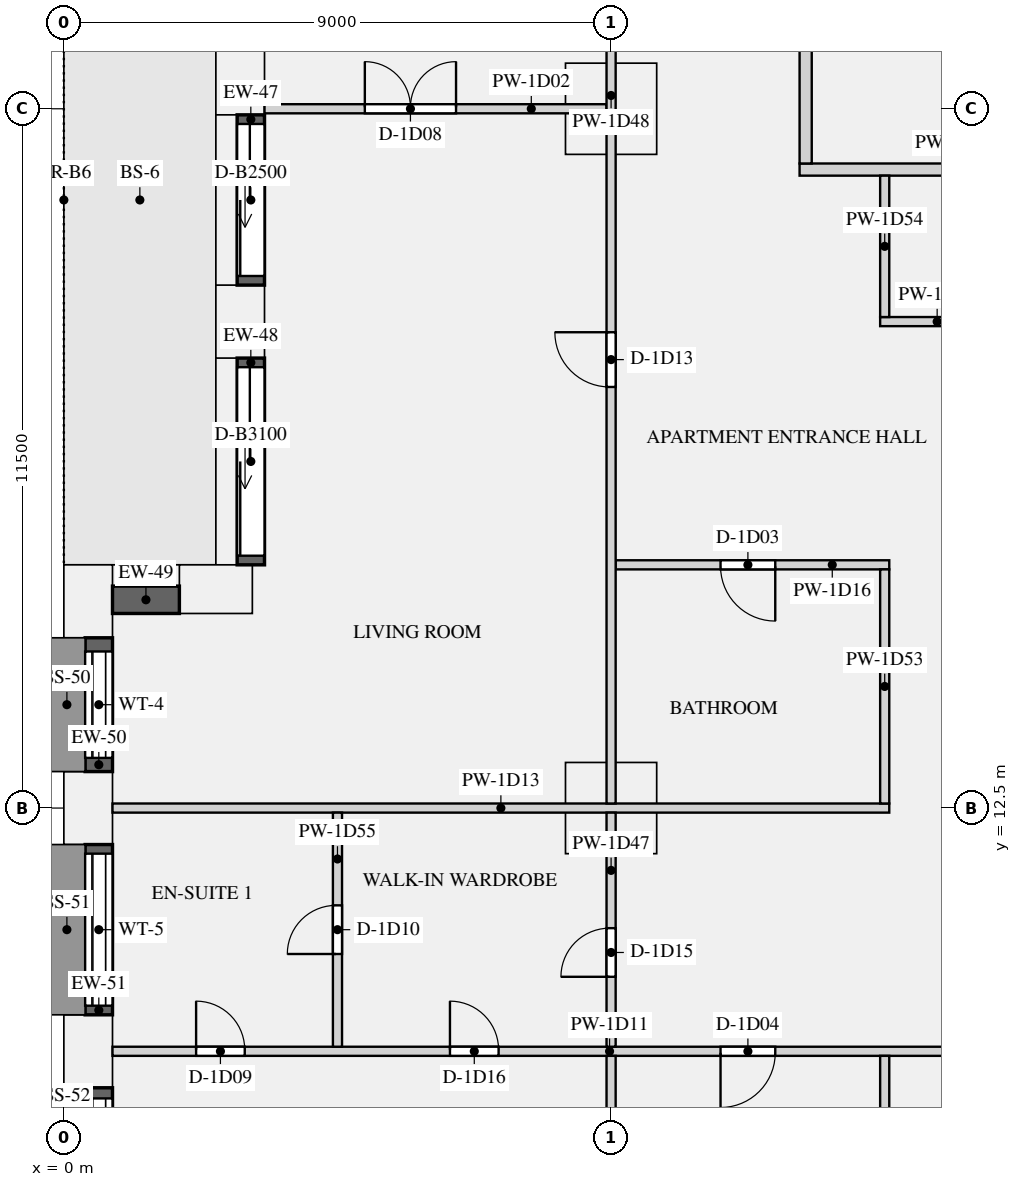
"""IFC4 building model, lengths in metres.
Left out: names, types, materials, properties, quantities, classifications, styles, units other than length and angle.
Written with IfcOpenShell. Run it as: python <this file> out.ifc"""

import sys

from ifc_helpers import new_model, si_unit, direction, frame, frame_2d, origin, origin_2d, place, context, subcontext, project, spatial, rectangle, extrude, element, fill, save


model = new_model("IFC4")
c1 = context("Model", 3, precision=1e-05, world=origin(), true_north=direction((0.0, 1.0)))
c2 = subcontext(c1, "Body", "Model", "MODEL_VIEW")
j1 = project(units=[si_unit("LENGTHUNIT", "METRE"), si_unit("PLANEANGLEUNIT", "RADIAN")], contexts=[c1])
p1 = place(None, origin())
s1 = spatial("IfcSite", under=j1, at=p1, CompositionType="ELEMENT")
p2 = place(p1, origin())
s2 = spatial("IfcBuilding", under=s1, at=p2, CompositionType="ELEMENT")
p3 = place(p2, frame((0.0, 0.0, 47.85)))
s3 = spatial("IfcBuildingStorey", under=s2, at=p3, CompositionType="ELEMENT", Elevation=47.85)
for number, where, z_axis, x_axis in (
    (1, (2.9, 24.5, 0.0), (0.0, 0.0, 1.0), (0.0, -1.0, 0.0)),
    (2, (2.9, 20.5, 0.0), (0.0, 0.0, 1.0), (0.0, -1.0, 0.0)),
    (3, (2.5, 16.1, 0.0), (0.0, 0.0, 1.0), (-1.0, 0.0, 0.0)),
    (4, (0.4, 15.9, 0.0), (0.0, 0.0, 1.0), (0.0, -1.0, 0.0)),
    (5, (0.4, 12.5, 0.0), (0.0, 0.0, 1.0), (0.0, -1.0, 0.0)),
    (6, (0.4, 8.5, 0.0), (0.0, 0.0, 1.0), (0.0, -1.0, 0.0)),
):
    element("IfcColumn", number, at=place(p3, frame(where, z_axis=z_axis, x_axis=x_axis)), inside=s3, PredefinedType="USERDEFINED", context=c2, shape_type="SweptSolid", body=[
        extrude(rectangle(XDim=1.2, YDim=0.8, at=origin_2d()), origin(), (0.0, 0.0, 1.0), 3.15),
    ])
for number, where, z_axis, x_axis in (
    (7, (9.0, 24.0, 0.0), (0.0, 0.0, 1.0), (1.0, 0.0, 0.0)),
    (8, (9.0, 12.5, 0.0), (0.0, 0.0, 1.0), (1.0, 0.0, 0.0)),
):
    element("IfcColumn", number, at=place(p3, frame(where, z_axis=z_axis, x_axis=x_axis)), inside=s3, PredefinedType="COLUMN", context=c2, shape_type="SweptSolid", body=[
        extrude(rectangle(XDim=1.5, YDim=1.5, at=origin_2d()), origin(), (0.0, 0.0, 1.0), 3.15),
    ])
p4 = place(p3, frame((3.075, 23.9, 0.0), z_axis=(0.0, 0.0, 1.0), x_axis=(0.0, -1.0, 0.0)))
e9 = element("IfcWall", 9, at=p4, inside=s3, PredefinedType="SOLIDWALL", context=c2, shape_type="SweptSolid", body=[
    extrude(rectangle(XDim=2.8, YDim=0.45, at=frame_2d((1.4, 0.0))), origin(), (0.0, 0.0, 1.0), 2.83),
])
p5 = place(p4, frame((0.15, 0.0, 0.0)))
e10 = element("IfcOpeningElement", 10, at=p5, cuts=e9, PredefinedType="OPENING", context=c2, shape_type="SweptSolid", body=[
    extrude(rectangle(XDim=2.5, YDim=2.3, at=frame_2d((1.25, 1.15))), frame((0.0, 0.235, 0.0), z_axis=(0.0, -1.0, 0.0), x_axis=(1.0, 0.0, 0.0)), (0.0, 0.0, 1.0), 0.47),
])
p6 = place(p3, frame((3.075, 19.9, 0.0), z_axis=(0.0, 0.0, 1.0), x_axis=(0.0, -1.0, 0.0)))
e11 = element("IfcWall", 11, at=p6, inside=s3, PredefinedType="SOLIDWALL", context=c2, shape_type="SweptSolid", body=[
    extrude(rectangle(XDim=3.4, YDim=0.45, at=frame_2d((1.7, 0.0))), origin(), (0.0, 0.0, 1.0), 2.83),
])
p7 = place(p6, frame((0.15, 0.0, 0.0)))
e12 = element("IfcOpeningElement", 12, at=p7, cuts=e11, PredefinedType="OPENING", context=c2, shape_type="SweptSolid", body=[
    extrude(rectangle(XDim=3.1, YDim=2.3, at=frame_2d((1.55, 1.15))), frame((0.0, 0.235, 0.0), z_axis=(0.0, -1.0, 0.0), x_axis=(1.0, 0.0, 0.0)), (0.0, 0.0, 1.0), 0.47),
])
p8 = place(p3, frame((1.9, 15.925, 0.9), z_axis=(0.0, 0.0, 1.0), x_axis=(-1.0, 0.0, 0.0)))
e13 = element("IfcWall", 13, at=p8, inside=s3, PredefinedType="SOLIDWALL", context=c2, shape_type="SweptSolid", body=[
    extrude(rectangle(XDim=1.1, YDim=0.45, at=frame_2d((0.55, 0.0))), origin(), (0.0, 0.0, 1.0), 1.93),
])
p9 = place(p3, frame((0.575, 15.3, 0.9), z_axis=(0.0, 0.0, 1.0), x_axis=(0.0, -1.0, 0.0)))
e14 = element("IfcWall", 14, at=p9, inside=s3, PredefinedType="SOLIDWALL", context=c2, shape_type="SweptSolid", body=[
    extrude(rectangle(XDim=2.2, YDim=0.45, at=frame_2d((1.1, 0.0))), origin(), (0.0, 0.0, 1.0), 1.93),
])
p10 = place(p9, frame((0.225, 0.0, 0.15)))
e15 = element("IfcOpeningElement", 15, at=p10, cuts=e14, PredefinedType="OPENING", context=c2, shape_type="SweptSolid", body=[
    extrude(rectangle(XDim=1.75, YDim=1.5, at=frame_2d((0.875, 0.75))), frame((0.0, 0.235, 0.0), z_axis=(0.0, -1.0, 0.0), x_axis=(1.0, 0.0, 0.0)), (0.0, 0.0, 1.0), 0.47),
])
p11 = place(p3, frame((0.575, 11.9, 0.9), z_axis=(0.0, 0.0, 1.0), x_axis=(0.0, -1.0, 0.0)))
e16 = element("IfcWall", 16, at=p11, inside=s3, PredefinedType="SOLIDWALL", context=c2, shape_type="SweptSolid", body=[
    extrude(rectangle(XDim=2.8, YDim=0.45, at=frame_2d((1.4, 0.0))), origin(), (0.0, 0.0, 1.0), 1.93),
])
p12 = place(p11, frame((0.15, 0.0, 0.15)))
e17 = element("IfcOpeningElement", 17, at=p12, cuts=e16, PredefinedType="OPENING", context=c2, shape_type="SweptSolid", body=[
    extrude(rectangle(XDim=2.5, YDim=1.5, at=frame_2d((1.25, 0.75))), frame((0.0, 0.235, 0.0), z_axis=(0.0, -1.0, 0.0), x_axis=(1.0, 0.0, 0.0)), (0.0, 0.0, 1.0), 0.47),
])
p13 = place(p3, frame((0.575, 7.9, 0.9), z_axis=(0.0, 0.0, 1.0), x_axis=(0.0, -1.0, 0.0)))
e18 = element("IfcWall", 18, at=p13, inside=s3, PredefinedType="SOLIDWALL", context=c2, shape_type="SweptSolid", body=[
    extrude(rectangle(XDim=2.6, YDim=0.45, at=frame_2d((1.3, 0.0))), origin(), (0.0, 0.0, 1.0), 1.93),
])
p14 = place(p13, frame((0.175, 0.0, 0.15)))
e19 = element("IfcOpeningElement", 19, at=p14, cuts=e18, PredefinedType="OPENING", context=c2, shape_type="SweptSolid", body=[
    extrude(rectangle(XDim=2.25, YDim=1.5, at=frame_2d((1.125, 0.75))), frame((0.0, 0.235, 0.0), z_axis=(0.0, -1.0, 0.0), x_axis=(1.0, 0.0, 0.0)), (0.0, 0.0, 1.0), 0.47),
])
p15 = place(p3, frame((12.1, 23.0, 0.0), z_axis=(0.0, 0.0, 1.0), x_axis=(1.0, 0.0, 0.0)))
e20 = element("IfcWall", 20, at=p15, inside=s3, PredefinedType="PARTITIONING", context=c2, shape_type="SweptSolid", body=[
    extrude(rectangle(XDim=5.0, YDim=0.2, at=frame_2d((2.5, 0.0))), origin(), (0.0, 0.0, 1.0), 2.83),
])
p16 = place(p3, frame((12.2, 23.1, 0.0), z_axis=(0.0, 0.0, 1.0), x_axis=(0.0, 1.0, 0.0)))
e21 = element("IfcWall", 21, at=p16, inside=s3, PredefinedType="PARTITIONING", context=c2, shape_type="SweptSolid", body=[
    extrude(rectangle(XDim=3.9, YDim=0.2, at=frame_2d((1.95, 0.0))), origin(), (0.0, 0.0, 1.0), 2.83),
])
p17 = place(p3, frame((3.3, 24.0, 0.0), z_axis=(0.0, 0.0, 1.0), x_axis=(1.0, 0.0, 0.0)))
e22 = element("IfcWall", 22, at=p17, inside=s3, PredefinedType="PARTITIONING", context=c2, shape_type="SweptSolid", body=[
    extrude(rectangle(XDim=5.625, YDim=0.15, at=frame_2d((2.812, 0.0))), origin(), (0.0, 0.0, 1.0), 2.83),
])
p18 = place(p17, frame((1.65, 0.0, 0.0)))
e23 = element("IfcOpeningElement", 23, at=p18, cuts=e22, PredefinedType="OPENING", context=c2, shape_type="SweptSolid", body=[
    extrude(rectangle(XDim=1.5, YDim=2.1, at=frame_2d((0.75, 1.05))), frame((0.0, 0.085, 0.0), z_axis=(0.0, -1.0, 0.0), x_axis=(1.0, 0.0, 0.0)), (0.0, 0.0, 1.0), 0.17),
])
p19 = place(p3, frame((0.8, 8.5, 0.0), z_axis=(0.0, 0.0, 1.0), x_axis=(1.0, 0.0, 0.0)))
e24 = element("IfcWall", 24, at=p19, inside=s3, PredefinedType="PARTITIONING", context=c2, shape_type="SweptSolid", body=[
    extrude(rectangle(XDim=17.2, YDim=0.15, at=frame_2d((8.6, 0.0))), origin(), (0.0, 0.0, 1.0), 2.83),
])
p20 = place(p19, frame((10.0, 0.0, 0.0)))
e25 = element("IfcOpeningElement", 25, at=p20, cuts=e24, PredefinedType="OPENING", context=c2, shape_type="SweptSolid", body=[
    extrude(rectangle(XDim=0.9, YDim=2.1, at=frame_2d((0.45, 1.05))), frame((0.0, 0.085, 0.0), z_axis=(0.0, -1.0, 0.0), x_axis=(1.0, 0.0, 0.0)), (0.0, 0.0, 1.0), 0.17),
])
p21 = place(p19, frame((14.5, 0.0, 0.0)))
e26 = element("IfcOpeningElement", 26, at=p21, cuts=e24, PredefinedType="OPENING", context=c2, shape_type="SweptSolid", body=[
    extrude(rectangle(XDim=0.9, YDim=2.1, at=frame_2d((0.45, 1.05))), frame((0.0, 0.085, 0.0), z_axis=(0.0, -1.0, 0.0), x_axis=(1.0, 0.0, 0.0)), (0.0, 0.0, 1.0), 0.17),
])
p22 = place(p19, frame((1.375, 0.0, 0.0)))
e27 = element("IfcOpeningElement", 27, at=p22, cuts=e24, PredefinedType="OPENING", context=c2, shape_type="SweptSolid", body=[
    extrude(rectangle(XDim=0.8, YDim=2.1, at=frame_2d((0.4, 1.05))), frame((0.0, 0.085, 0.0), z_axis=(0.0, -1.0, 0.0), x_axis=(1.0, 0.0, 0.0)), (0.0, 0.0, 1.0), 0.17),
])
p23 = place(p19, frame((5.55, 0.0, 0.0)))
e28 = element("IfcOpeningElement", 28, at=p23, cuts=e24, PredefinedType="OPENING", context=c2, shape_type="SweptSolid", body=[
    extrude(rectangle(XDim=0.8, YDim=2.1, at=frame_2d((0.4, 1.05))), frame((0.0, 0.085, 0.0), z_axis=(0.0, -1.0, 0.0), x_axis=(1.0, 0.0, 0.0)), (0.0, 0.0, 1.0), 0.17),
])
p24 = place(p3, frame((0.8, 12.5, 0.0), z_axis=(0.0, 0.0, 1.0), x_axis=(1.0, 0.0, 0.0)))
e29 = element("IfcWall", 29, at=p24, inside=s3, PredefinedType="PARTITIONING", context=c2, shape_type="SweptSolid", body=[
    extrude(rectangle(XDim=12.775, YDim=0.15, at=frame_2d((6.387, 0.0))), origin(), (0.0, 0.0, 1.0), 2.83),
])
p25 = place(p3, frame((13.425, 20.5, 0.0), z_axis=(0.0, 0.0, 1.0), x_axis=(1.0, 0.0, 0.0)))
e30 = element("IfcWall", 30, at=p25, inside=s3, PredefinedType="PARTITIONING", context=c2, shape_type="SweptSolid", body=[
    extrude(rectangle(XDim=4.475, YDim=0.15, at=frame_2d((2.237, 0.0))), origin(), (0.0, 0.0, 1.0), 2.83),
])
p26 = place(p25, frame((1.875, 0.0, 0.0)))
e31 = element("IfcOpeningElement", 31, at=p26, cuts=e30, PredefinedType="OPENING", context=c2, shape_type="SweptSolid", body=[
    extrude(rectangle(XDim=0.9, YDim=2.1, at=frame_2d((0.45, 1.05))), frame((0.0, 0.085, 0.0), z_axis=(0.0, -1.0, 0.0), x_axis=(1.0, 0.0, 0.0)), (0.0, 0.0, 1.0), 0.17),
])
p27 = place(p3, frame((9.075, 16.5, 0.0), z_axis=(0.0, 0.0, 1.0), x_axis=(1.0, 0.0, 0.0)))
e32 = element("IfcWall", 32, at=p27, inside=s3, PredefinedType="PARTITIONING", context=c2, shape_type="SweptSolid", body=[
    extrude(rectangle(XDim=4.5, YDim=0.15, at=frame_2d((2.25, 0.0))), origin(), (0.0, 0.0, 1.0), 2.83),
])
p28 = place(p27, frame((1.725, 0.0, 0.0)))
e33 = element("IfcOpeningElement", 33, at=p28, cuts=e32, PredefinedType="OPENING", context=c2, shape_type="SweptSolid", body=[
    extrude(rectangle(XDim=0.9, YDim=2.1, at=frame_2d((0.45, 1.05))), frame((0.0, 0.085, 0.0), z_axis=(0.0, -1.0, 0.0), x_axis=(1.0, 0.0, 0.0)), (0.0, 0.0, 1.0), 0.17),
])
p29 = place(p3, frame((9.0, 0.8, 0.0), z_axis=(0.0, 0.0, 1.0), x_axis=(0.0, 1.0, 0.0)))
e34 = element("IfcWall", 34, at=p29, inside=s3, PredefinedType="PARTITIONING", context=c2, shape_type="SweptSolid", body=[
    extrude(rectangle(XDim=7.625, YDim=0.15, at=frame_2d((3.812, 0.0))), origin(), (0.0, 0.0, 1.0), 2.83),
])
p30 = place(p3, frame((9.0, 8.575, 0.0), z_axis=(0.0, 0.0, 1.0), x_axis=(0.0, 1.0, 0.0)))
e35 = element("IfcWall", 35, at=p30, inside=s3, PredefinedType="PARTITIONING", context=c2, shape_type="SweptSolid", body=[
    extrude(rectangle(XDim=3.85, YDim=0.15, at=frame_2d((1.925, 0.0))), origin(), (0.0, 0.0, 1.0), 2.83),
])
p31 = place(p30, frame((1.15, 0.0, 0.0)))
e36 = element("IfcOpeningElement", 36, at=p31, cuts=e35, PredefinedType="OPENING", context=c2, shape_type="SweptSolid", body=[
    extrude(rectangle(XDim=0.8, YDim=2.1, at=frame_2d((0.4, 1.05))), frame((0.0, 0.085, 0.0), z_axis=(0.0, -1.0, 0.0), x_axis=(1.0, 0.0, 0.0)), (0.0, 0.0, 1.0), 0.17),
])
p32 = place(p3, frame((9.0, 12.575, 0.0), z_axis=(0.0, 0.0, 1.0), x_axis=(0.0, 1.0, 0.0)))
e37 = element("IfcWall", 37, at=p32, inside=s3, PredefinedType="PARTITIONING", context=c2, shape_type="SweptSolid", body=[
    extrude(rectangle(XDim=19.725, YDim=0.15, at=frame_2d((9.863, 0.0))), origin(), (0.0, 0.0, 1.0), 2.83),
])
p33 = place(p32, frame((15.537, 0.0, 0.0)))
e38 = element("IfcOpeningElement", 38, at=p33, cuts=e37, PredefinedType="OPENING", context=c2, shape_type="SweptSolid", body=[
    extrude(rectangle(XDim=0.9, YDim=2.1, at=frame_2d((0.45, 1.05))), frame((0.0, 0.085, 0.0), z_axis=(0.0, -1.0, 0.0), x_axis=(1.0, 0.0, 0.0)), (0.0, 0.0, 1.0), 0.17),
])
p34 = place(p32, frame((6.85, 0.0, 0.0)))
e39 = element("IfcOpeningElement", 39, at=p34, cuts=e37, PredefinedType="OPENING", context=c2, shape_type="SweptSolid", body=[
    extrude(rectangle(XDim=0.9, YDim=2.1, at=frame_2d((0.45, 1.05))), frame((0.0, 0.085, 0.0), z_axis=(0.0, -1.0, 0.0), x_axis=(1.0, 0.0, 0.0)), (0.0, 0.0, 1.0), 0.17),
])
p35 = place(p3, frame((13.5, 0.8, 0.0), z_axis=(0.0, 0.0, 1.0), x_axis=(0.0, 1.0, 0.0)))
e40 = element("IfcWall", 40, at=p35, inside=s3, PredefinedType="PARTITIONING", context=c2, shape_type="SweptSolid", body=[
    extrude(rectangle(XDim=7.625, YDim=0.15, at=frame_2d((3.812, 0.0))), origin(), (0.0, 0.0, 1.0), 2.83),
])
p36 = place(p3, frame((13.5, 12.575, 0.0), z_axis=(0.0, 0.0, 1.0), x_axis=(0.0, 1.0, 0.0)))
e41 = element("IfcWall", 41, at=p36, inside=s3, PredefinedType="PARTITIONING", context=c2, shape_type="SweptSolid", body=[
    extrude(rectangle(XDim=3.85, YDim=0.15, at=frame_2d((1.925, 0.0))), origin(), (0.0, 0.0, 1.0), 2.83),
])
p37 = place(p3, frame((13.5, 20.575, 0.0), z_axis=(0.0, 0.0, 1.0), x_axis=(0.0, 1.0, 0.0)))
e42 = element("IfcWall", 42, at=p37, inside=s3, PredefinedType="PARTITIONING", context=c2, shape_type="SweptSolid", body=[
    extrude(rectangle(XDim=2.325, YDim=0.15, at=frame_2d((1.163, 0.0))), origin(), (0.0, 0.0, 1.0), 2.83),
])
p38 = place(p3, frame((4.5, 8.575, 0.0), z_axis=(0.0, 0.0, 1.0), x_axis=(0.0, 1.0, 0.0)))
e43 = element("IfcWall", 43, at=p38, inside=s3, PredefinedType="PARTITIONING", context=c2, shape_type="SweptSolid", body=[
    extrude(rectangle(XDim=3.85, YDim=0.15, at=frame_2d((1.925, 0.0))), origin(), (0.0, 0.0, 1.0), 2.83),
])
p39 = place(p38, frame((1.525, 0.0, 0.0)))
e44 = element("IfcOpeningElement", 44, at=p39, cuts=e43, PredefinedType="OPENING", context=c2, shape_type="SweptSolid", body=[
    extrude(rectangle(XDim=0.8, YDim=2.1, at=frame_2d((0.4, 1.05))), frame((0.0, 0.085, 0.0), z_axis=(0.0, -1.0, 0.0), x_axis=(1.0, 0.0, 0.0)), (0.0, 0.0, 1.0), 0.17),
])
p40 = place(p5, origin())
e45 = element("IfcDoor", 45, at=p40, inside=s3, OperationType="SLIDING_TO_LEFT", PredefinedType="DOOR", context=c2, shape_type="SweptSolid", body=[
    extrude(rectangle(XDim=2.5, YDim=2.3, at=frame_2d((1.25, 1.15))), frame((0.0, -0.07, 0.0), z_axis=(0.0, -1.0, 0.0), x_axis=(1.0, 0.0, 0.0)), (0.0, 0.0, 1.0), 0.05),
])
fill(e10, e45)
p41 = place(p7, origin())
e46 = element("IfcDoor", 46, at=p41, inside=s3, OperationType="SLIDING_TO_LEFT", PredefinedType="DOOR", context=c2, shape_type="SweptSolid", body=[
    extrude(rectangle(XDim=3.1, YDim=2.3, at=frame_2d((1.55, 1.15))), frame((0.0, -0.07, 0.0), z_axis=(0.0, -1.0, 0.0), x_axis=(1.0, 0.0, 0.0)), (0.0, 0.0, 1.0), 0.05),
])
fill(e12, e46)
p42 = place(p10, origin())
e47 = element("IfcWindow", 47, at=p42, inside=s3, PartitioningType="SINGLE_PANEL", PredefinedType="WINDOW", context=c2, shape_type="SweptSolid", body=[
    extrude(rectangle(XDim=1.75, YDim=1.5, at=frame_2d((0.875, 0.75))), frame((0.0, -0.065, 0.0), z_axis=(0.0, -1.0, 0.0), x_axis=(1.0, 0.0, 0.0)), (0.0, 0.0, 1.0), 0.06),
])
fill(e15, e47)
p43 = place(p12, origin())
e48 = element("IfcWindow", 48, at=p43, inside=s3, PartitioningType="SINGLE_PANEL", PredefinedType="WINDOW", context=c2, shape_type="SweptSolid", body=[
    extrude(rectangle(XDim=2.5, YDim=1.5, at=frame_2d((1.25, 0.75))), frame((0.0, -0.065, 0.0), z_axis=(0.0, -1.0, 0.0), x_axis=(1.0, 0.0, 0.0)), (0.0, 0.0, 1.0), 0.06),
])
fill(e17, e48)
p44 = place(p14, origin())
e49 = element("IfcWindow", 49, at=p44, inside=s3, PartitioningType="SINGLE_PANEL", PredefinedType="WINDOW", context=c2, shape_type="SweptSolid", body=[
    extrude(rectangle(XDim=2.25, YDim=1.5, at=frame_2d((1.125, 0.75))), frame((0.0, -0.065, 0.0), z_axis=(0.0, -1.0, 0.0), x_axis=(1.0, 0.0, 0.0)), (0.0, 0.0, 1.0), 0.06),
])
fill(e19, e49)
p45 = place(p28, frame((0.9, 0.0, 0.0), z_axis=(0.0, 0.0, 1.0), x_axis=(-1.0, 0.0, 0.0)))
e50 = element("IfcDoor", 50, at=p45, inside=s3, OperationType="SINGLE_SWING_LEFT", PredefinedType="DOOR", context=c2, shape_type="SweptSolid", body=[
    extrude(rectangle(XDim=0.9, YDim=2.1, at=frame_2d((0.45, 1.05))), frame((0.0, 0.025, 0.0), z_axis=(0.0, -1.0, 0.0), x_axis=(1.0, 0.0, 0.0)), (0.0, 0.0, 1.0), 0.05),
])
fill(e33, e50)
p46 = place(p20, frame((0.9, 0.0, 0.0), z_axis=(0.0, 0.0, 1.0), x_axis=(-1.0, 0.0, 0.0)))
e51 = element("IfcDoor", 51, at=p46, inside=s3, OperationType="SINGLE_SWING_RIGHT", PredefinedType="DOOR", context=c2, shape_type="SweptSolid", body=[
    extrude(rectangle(XDim=0.9, YDim=2.1, at=frame_2d((0.45, 1.05))), frame((0.0, 0.025, 0.0), z_axis=(0.0, -1.0, 0.0), x_axis=(1.0, 0.0, 0.0)), (0.0, 0.0, 1.0), 0.05),
])
fill(e25, e51)
p47 = place(p18, origin())
e52 = element("IfcDoor", 52, at=p47, inside=s3, OperationType="DOUBLE_DOOR_SINGLE_SWING", PredefinedType="DOOR", context=c2, shape_type="SweptSolid", body=[
    extrude(rectangle(XDim=1.5, YDim=2.1, at=frame_2d((0.75, 1.05))), frame((0.0, 0.025, 0.0), z_axis=(0.0, -1.0, 0.0), x_axis=(1.0, 0.0, 0.0)), (0.0, 0.0, 1.0), 0.05),
])
fill(e23, e52)
p48 = place(p22, origin())
e53 = element("IfcDoor", 53, at=p48, inside=s3, OperationType="SINGLE_SWING_LEFT", PredefinedType="DOOR", context=c2, shape_type="SweptSolid", body=[
    extrude(rectangle(XDim=0.8, YDim=2.1, at=frame_2d((0.4, 1.05))), frame((0.0, 0.025, 0.0), z_axis=(0.0, -1.0, 0.0), x_axis=(1.0, 0.0, 0.0)), (0.0, 0.0, 1.0), 0.05),
])
fill(e27, e53)
p49 = place(p39, origin())
e54 = element("IfcDoor", 54, at=p49, inside=s3, OperationType="SINGLE_SWING_LEFT", PredefinedType="DOOR", context=c2, shape_type="SweptSolid", body=[
    extrude(rectangle(XDim=0.8, YDim=2.1, at=frame_2d((0.4, 1.05))), frame((0.0, 0.025, 0.0), z_axis=(0.0, -1.0, 0.0), x_axis=(1.0, 0.0, 0.0)), (0.0, 0.0, 1.0), 0.05),
])
fill(e44, e54)
p50 = place(p34, origin())
e55 = element("IfcDoor", 55, at=p50, inside=s3, OperationType="SINGLE_SWING_RIGHT", PredefinedType="DOOR", context=c2, shape_type="SweptSolid", body=[
    extrude(rectangle(XDim=0.9, YDim=2.1, at=frame_2d((0.45, 1.05))), frame((0.0, 0.025, 0.0), z_axis=(0.0, -1.0, 0.0), x_axis=(1.0, 0.0, 0.0)), (0.0, 0.0, 1.0), 0.05),
])
fill(e39, e55)
p51 = place(p31, origin())
e56 = element("IfcDoor", 56, at=p51, inside=s3, OperationType="SINGLE_SWING_LEFT", PredefinedType="DOOR", context=c2, shape_type="SweptSolid", body=[
    extrude(rectangle(XDim=0.8, YDim=2.1, at=frame_2d((0.4, 1.05))), frame((0.0, 0.025, 0.0), z_axis=(0.0, -1.0, 0.0), x_axis=(1.0, 0.0, 0.0)), (0.0, 0.0, 1.0), 0.05),
])
fill(e36, e56)
p52 = place(p23, origin())
e57 = element("IfcDoor", 57, at=p52, inside=s3, OperationType="SINGLE_SWING_LEFT", PredefinedType="DOOR", context=c2, shape_type="SweptSolid", body=[
    extrude(rectangle(XDim=0.8, YDim=2.1, at=frame_2d((0.4, 1.05))), frame((0.0, 0.025, 0.0), z_axis=(0.0, -1.0, 0.0), x_axis=(1.0, 0.0, 0.0)), (0.0, 0.0, 1.0), 0.05),
])
fill(e28, e57)
save(model, sys.argv[1])
